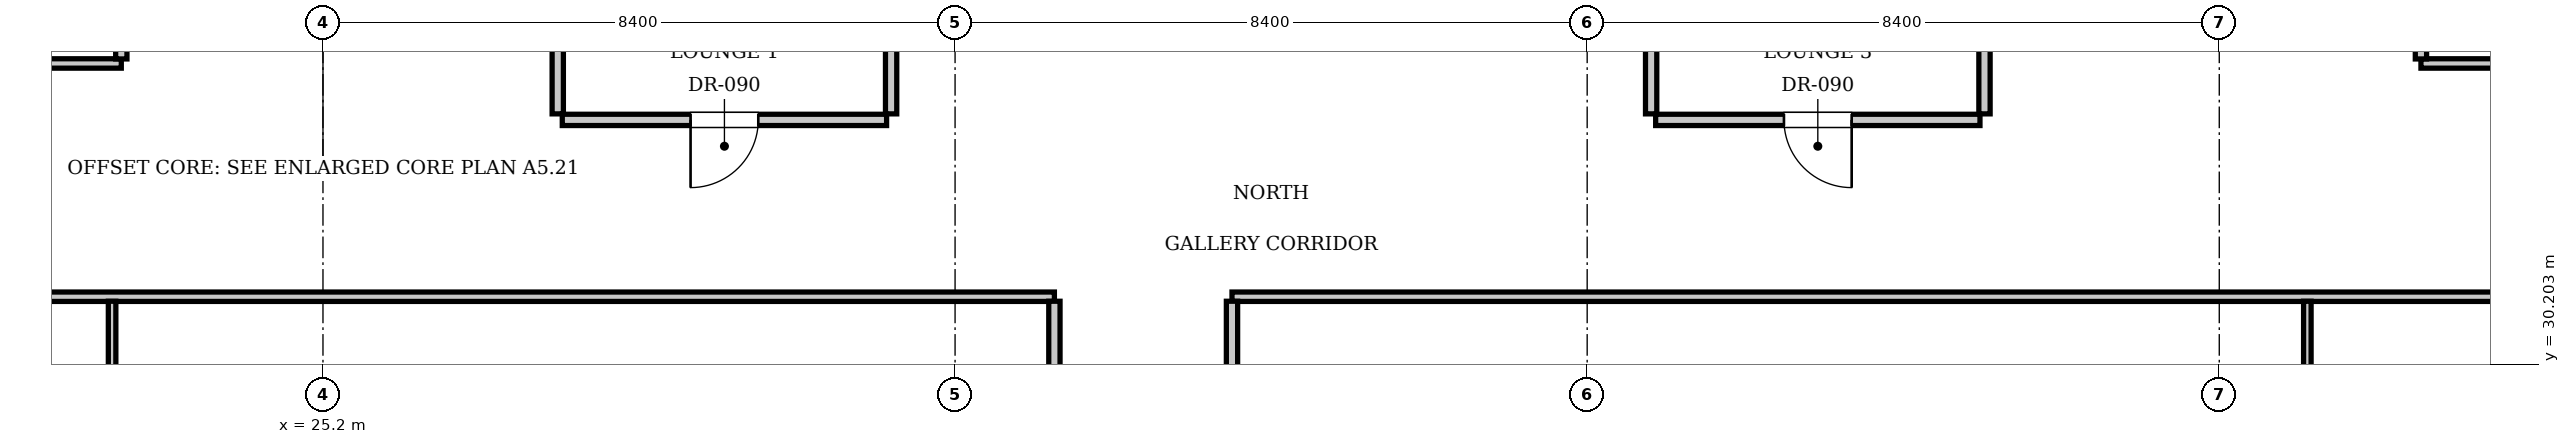
"""IFC4 building model, lengths in metres.
Left out: names, types, materials, properties, quantities, classifications, styles, units other than length and angle.
Written with IfcOpenShell. Run it as: python <this file> out.ifc"""

import sys

from ifc_helpers import new_model, si_unit, direction, frame, frame_2d, origin, place, context, subcontext, project, spatial, rectangle, extrude, element, fill, save


model = new_model("IFC4")
c1 = context("Model", 3, precision=1e-05, world=origin(), true_north=direction((0.0, 1.0)))
c2 = subcontext(c1, "Body", "Model", "MODEL_VIEW")
j1 = project(units=[si_unit("LENGTHUNIT", "METRE"), si_unit("PLANEANGLEUNIT", "RADIAN")], contexts=[c1])
p1 = place(None, origin())
s1 = spatial("IfcSite", under=j1, at=p1, CompositionType="ELEMENT")
p2 = place(p1, origin())
s2 = spatial("IfcBuilding", under=s1, at=p2, CompositionType="ELEMENT")
p3 = place(p2, frame((0.0, 0.0, 223.65)))
s3 = spatial("IfcBuildingStorey", under=s2, at=p3, CompositionType="ELEMENT", Elevation=223.65)
for number, where, z_axis, x_axis in (
    (1, (28.32, 33.53, 0.0), (0.0, 0.0, 1.0), (0.0, 1.0, 0.0)),
    (2, (32.75, 33.53, 0.0), (0.0, 0.0, 1.0), (0.0, 1.0, 0.0)),
):
    element("IfcWall", number, at=place(p3, frame(where, z_axis=z_axis, x_axis=x_axis)), inside=s3, PredefinedType="PARTITIONING", context=c2, shape_type="SweptSolid", body=[
        extrude(rectangle(XDim=2.59, YDim=0.15, at=frame_2d((1.295, 0.0))), origin(), (0.0, 0.0, 1.0), 3.55),
    ])
p4 = place(p3, frame((28.38, 33.45, 0.0), z_axis=(0.0, 0.0, 1.0), x_axis=(1.0, 0.0, 0.0)))
e3 = element("IfcWall", 3, at=p4, inside=s3, PredefinedType="PARTITIONING", context=c2, shape_type="SweptSolid", body=[
    extrude(rectangle(XDim=4.31, YDim=0.15, at=frame_2d((2.155, 0.0))), origin(), (0.0, 0.0, 1.0), 3.55),
])
p5 = place(p4, frame((1.705, 0.0, 0.0)))
e4 = element("IfcOpeningElement", 4, at=p5, cuts=e3, PredefinedType="OPENING", context=c2, shape_type="SweptSolid", body=[
    extrude(rectangle(XDim=0.9, YDim=2.1, at=frame_2d((0.45, 1.05))), frame((0.0, 0.085, 0.0), z_axis=(0.0, -1.0, 0.0), x_axis=(1.0, 0.0, 0.0)), (0.0, 0.0, 1.0), 0.17),
])
for number, where, z_axis, x_axis in (
    (5, (42.85, 33.53, 0.0), (0.0, 0.0, 1.0), (0.0, 1.0, 0.0)),
    (6, (47.28, 33.53, 0.0), (0.0, 0.0, 1.0), (0.0, 1.0, 0.0)),
):
    element("IfcWall", number, at=place(p3, frame(where, z_axis=z_axis, x_axis=x_axis)), inside=s3, PredefinedType="PARTITIONING", context=c2, shape_type="SweptSolid", body=[
        extrude(rectangle(XDim=2.59, YDim=0.15, at=frame_2d((1.295, 0.0))), origin(), (0.0, 0.0, 1.0), 3.55),
    ])
p6 = place(p3, frame((42.91, 33.45, 0.0), z_axis=(0.0, 0.0, 1.0), x_axis=(1.0, 0.0, 0.0)))
e7 = element("IfcWall", 7, at=p6, inside=s3, PredefinedType="PARTITIONING", context=c2, shape_type="SweptSolid", body=[
    extrude(rectangle(XDim=4.31, YDim=0.15, at=frame_2d((2.155, 0.0))), origin(), (0.0, 0.0, 1.0), 3.55),
])
p7 = place(p6, frame((1.705, 0.0, 0.0)))
e8 = element("IfcOpeningElement", 8, at=p7, cuts=e7, PredefinedType="OPENING", context=c2, shape_type="SweptSolid", body=[
    extrude(rectangle(XDim=0.9, YDim=2.1, at=frame_2d((0.45, 1.05))), frame((0.0, 0.085, 0.0), z_axis=(0.0, -1.0, 0.0), x_axis=(1.0, 0.0, 0.0)), (0.0, 0.0, 1.0), 0.17),
])
p8 = place(p3, frame((13.2, 31.1, 0.0), z_axis=(0.0, 0.0, 1.0), x_axis=(1.0, 0.0, 0.0)))
e9 = element("IfcWall", 9, at=p8, inside=s3, PredefinedType="PARTITIONING", context=c2, shape_type="SweptSolid", body=[
    extrude(rectangle(XDim=21.72, YDim=0.125, at=frame_2d((10.86, 0.0))), origin(), (0.0, 0.0, 1.0), 3.55),
])
p9 = place(p3, frame((37.28, 31.1, 0.0), z_axis=(0.0, 0.0, 1.0), x_axis=(1.0, 0.0, 0.0)))
e10 = element("IfcWall", 10, at=p9, inside=s3, PredefinedType="PARTITIONING", context=c2, shape_type="SweptSolid", body=[
    extrude(rectangle(XDim=25.12, YDim=0.125, at=frame_2d((12.56, 0.0))), origin(), (0.0, 0.0, 1.0), 3.55),
])
p10 = place(p3, frame((34.92, 25.55, 0.0), z_axis=(0.0, 0.0, 1.0), x_axis=(0.0, 1.0, 0.0)))
e11 = element("IfcWall", 11, at=p10, inside=s3, PredefinedType="PARTITIONING", context=c2, shape_type="SweptSolid", body=[
    extrude(rectangle(XDim=5.49, YDim=0.15, at=frame_2d((2.745, 0.0))), origin(), (0.0, 0.0, 1.0), 3.55),
])
p11 = place(p10, frame((2.27, 0.0, 0.0)))
e12 = element("IfcOpeningElement", 12, at=p11, cuts=e11, PredefinedType="OPENING", context=c2, shape_type="SweptSolid", body=[
    extrude(rectangle(XDim=0.95, YDim=2.15, at=frame_2d((0.475, 1.075))), frame((0.0, 0.085, 0.0), z_axis=(0.0, -1.0, 0.0), x_axis=(1.0, 0.0, 0.0)), (0.0, 0.0, 1.0), 0.17),
])
p12 = place(p3, frame((22.398, 23.26, 0.0), z_axis=(0.0, 0.0, 1.0), x_axis=(0.0, 1.0, 0.0)))
e13 = element("IfcWall", 13, at=p12, inside=s3, PredefinedType="PARTITIONING", context=c2, shape_type="SweptSolid", body=[
    extrude(rectangle(XDim=7.78, YDim=0.1, at=frame_2d((3.89, 0.0))), origin(), (0.0, 0.0, 1.0), 3.55),
])
p13 = place(p12, frame((3.44, 0.0, 0.0)))
e14 = element("IfcOpeningElement", 14, at=p13, cuts=e13, PredefinedType="OPENING", context=c2, shape_type="SweptSolid", body=[
    extrude(rectangle(XDim=0.9, YDim=2.1, at=frame_2d((0.45, 1.05))), frame((0.0, 0.06, 0.0), z_axis=(0.0, -1.0, 0.0), x_axis=(1.0, 0.0, 0.0)), (0.0, 0.0, 1.0), 0.12),
])
p14 = place(p3, frame((37.28, 25.55, 0.0), z_axis=(0.0, 0.0, 1.0), x_axis=(0.0, 1.0, 0.0)))
e15 = element("IfcWall", 15, at=p14, inside=s3, PredefinedType="PARTITIONING", context=c2, shape_type="SweptSolid", body=[
    extrude(rectangle(XDim=5.49, YDim=0.15, at=frame_2d((2.745, 0.0))), origin(), (0.0, 0.0, 1.0), 3.55),
])
p15 = place(p14, frame((2.27, 0.0, 0.0)))
e16 = element("IfcOpeningElement", 16, at=p15, cuts=e15, PredefinedType="OPENING", context=c2, shape_type="SweptSolid", body=[
    extrude(rectangle(XDim=0.95, YDim=2.15, at=frame_2d((0.475, 1.075))), frame((0.0, 0.085, 0.0), z_axis=(0.0, -1.0, 0.0), x_axis=(1.0, 0.0, 0.0)), (0.0, 0.0, 1.0), 0.17),
])
p16 = place(p3, frame((51.57, 23.26, 0.0), z_axis=(0.0, 0.0, 1.0), x_axis=(0.0, 1.0, 0.0)))
e17 = element("IfcWall", 17, at=p16, inside=s3, PredefinedType="PARTITIONING", context=c2, shape_type="SweptSolid", body=[
    extrude(rectangle(XDim=7.78, YDim=0.1, at=frame_2d((3.89, 0.0))), origin(), (0.0, 0.0, 1.0), 3.55),
])
p17 = place(p16, frame((5.0, 0.0, 0.0)))
e18 = element("IfcOpeningElement", 18, at=p17, cuts=e17, PredefinedType="OPENING", context=c2, shape_type="SweptSolid", body=[
    extrude(rectangle(XDim=0.9, YDim=2.1, at=frame_2d((0.45, 1.05))), frame((0.0, 0.06, 0.0), z_axis=(0.0, -1.0, 0.0), x_axis=(1.0, 0.0, 0.0)), (0.0, 0.0, 1.0), 0.12),
])
p18 = place(p3, frame((13.2, 34.2, 0.0), z_axis=(0.0, 0.0, 1.0), x_axis=(1.0, 0.0, 0.0)))
e19 = element("IfcWall", 19, at=p18, inside=s3, PredefinedType="PARTITIONING", context=c2, shape_type="SweptSolid", body=[
    extrude(rectangle(XDim=9.32, YDim=0.125, at=frame_2d((4.66, 0.0))), origin(), (0.0, 0.0, 1.0), 3.55),
])
p19 = place(p3, frame((53.08, 34.2, 0.0), z_axis=(0.0, 0.0, 1.0), x_axis=(1.0, 0.0, 0.0)))
e20 = element("IfcWall", 20, at=p19, inside=s3, PredefinedType="PARTITIONING", context=c2, shape_type="SweptSolid", body=[
    extrude(rectangle(XDim=9.32, YDim=0.125, at=frame_2d((4.66, 0.0))), origin(), (0.0, 0.0, 1.0), 3.55),
])
p20 = place(p3, frame((22.52, 34.26, 0.0), z_axis=(0.0, 0.0, 1.0), x_axis=(0.0, 1.0, 0.0)))
e21 = element("IfcWall", 21, at=p20, inside=s3, PredefinedType="PARTITIONING", context=c2, shape_type="SweptSolid", body=[
    extrude(rectangle(XDim=12.927, YDim=0.15, at=frame_2d((6.464, 0.0))), origin(), (0.0, 0.0, 1.0), 3.55),
])
p21 = place(p20, frame((5.989, 0.0, 0.0)))
e22 = element("IfcOpeningElement", 22, at=p21, cuts=e21, PredefinedType="OPENING", context=c2, shape_type="SweptSolid", body=[
    extrude(rectangle(XDim=0.95, YDim=2.15, at=frame_2d((0.475, 1.075))), frame((0.0, 0.085, 0.0), z_axis=(0.0, -1.0, 0.0), x_axis=(1.0, 0.0, 0.0)), (0.0, 0.0, 1.0), 0.17),
])
p22 = place(p3, frame((53.08, 34.26, 0.0), z_axis=(0.0, 0.0, 1.0), x_axis=(0.0, 1.0, 0.0)))
e23 = element("IfcWall", 23, at=p22, inside=s3, PredefinedType="PARTITIONING", context=c2, shape_type="SweptSolid", body=[
    extrude(rectangle(XDim=12.927, YDim=0.15, at=frame_2d((6.464, 0.0))), origin(), (0.0, 0.0, 1.0), 3.55),
])
p23 = place(p22, frame((5.989, 0.0, 0.0)))
e24 = element("IfcOpeningElement", 24, at=p23, cuts=e23, PredefinedType="OPENING", context=c2, shape_type="SweptSolid", body=[
    extrude(rectangle(XDim=0.95, YDim=2.15, at=frame_2d((0.475, 1.075))), frame((0.0, 0.085, 0.0), z_axis=(0.0, -1.0, 0.0), x_axis=(1.0, 0.0, 0.0)), (0.0, 0.0, 1.0), 0.17),
])
p24 = place(p5, frame((0.9, 0.0, 0.0), z_axis=(0.0, 0.0, 1.0), x_axis=(-1.0, 0.0, 0.0)))
e25 = element("IfcDoor", 25, at=p24, inside=s3, OperationType="SINGLE_SWING_RIGHT", PredefinedType="DOOR", context=c2, shape_type="SweptSolid", body=[
    extrude(rectangle(XDim=0.9, YDim=2.1, at=frame_2d((0.45, 1.05))), frame((0.0, 0.025, 0.0), z_axis=(0.0, -1.0, 0.0), x_axis=(1.0, 0.0, 0.0)), (0.0, 0.0, 1.0), 0.05),
])
fill(e4, e25)
p25 = place(p7, frame((0.9, 0.0, 0.0), z_axis=(0.0, 0.0, 1.0), x_axis=(-1.0, 0.0, 0.0)))
e26 = element("IfcDoor", 26, at=p25, inside=s3, OperationType="SINGLE_SWING_LEFT", PredefinedType="DOOR", context=c2, shape_type="SweptSolid", body=[
    extrude(rectangle(XDim=0.9, YDim=2.1, at=frame_2d((0.45, 1.05))), frame((0.0, 0.025, 0.0), z_axis=(0.0, -1.0, 0.0), x_axis=(1.0, 0.0, 0.0)), (0.0, 0.0, 1.0), 0.05),
])
fill(e8, e26)
save(model, sys.argv[1])
